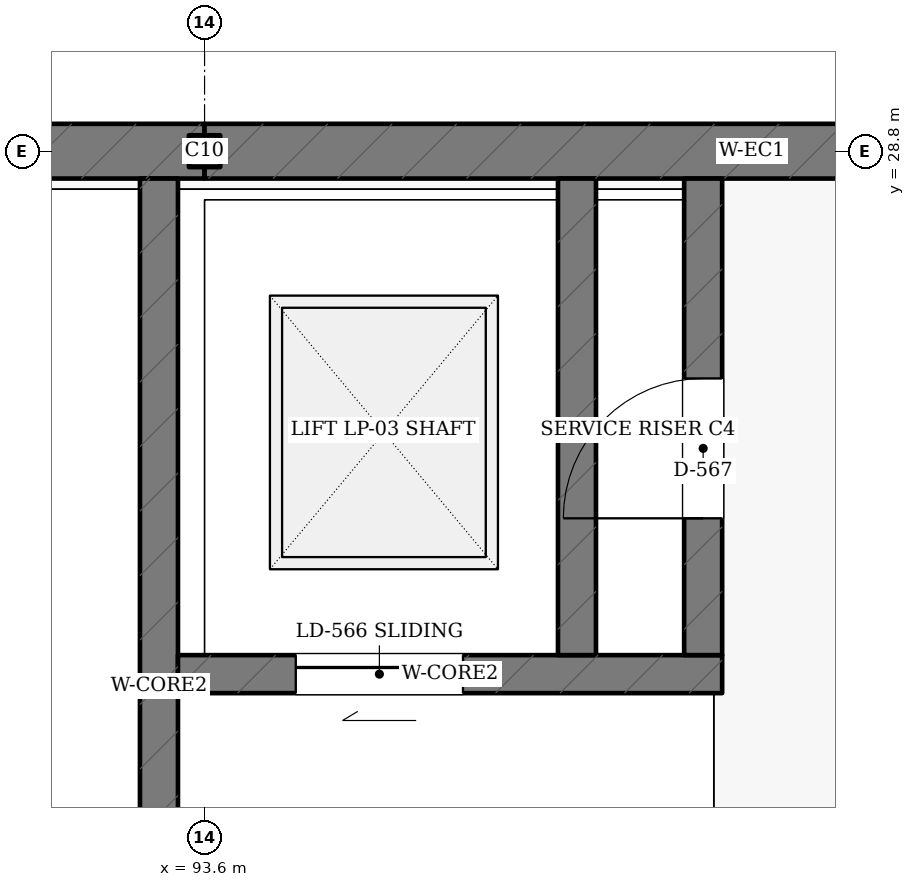
"""IFC4 building model, lengths in metres.
Left out: names, types, materials, properties, quantities, classifications, styles, units other than length and angle.
Written with IfcOpenShell. Run it as: python <this file> out.ifc"""

import sys

from ifc_helpers import new_model, si_unit, direction, frame, frame_2d, origin, origin_2d, place, context, subcontext, project, spatial, rectangle, i_section, extrude, element, fill, save


model = new_model("IFC4")
c1 = context("Model", 3, precision=1e-05, world=origin(), true_north=direction((0.0, 1.0)))
c2 = subcontext(c1, "Body", "Model", "MODEL_VIEW")
j1 = project(units=[si_unit("LENGTHUNIT", "METRE"), si_unit("PLANEANGLEUNIT", "RADIAN")], contexts=[c1])
p1 = place(None, origin())
s1 = spatial("IfcSite", under=j1, at=p1, CompositionType="ELEMENT")
p2 = place(p1, origin())
s2 = spatial("IfcBuilding", under=s1, at=p2, CompositionType="ELEMENT")
p3 = place(p2, frame((0.0, 0.0, 9.9)))
s3 = spatial("IfcBuildingStorey", under=s2, at=p3, CompositionType="ELEMENT", Elevation=9.9)
p4 = place(p3, frame((93.6, 28.8, 0.0), z_axis=(0.0, 0.0, 1.0), x_axis=(1.0, 0.0, 0.0)))
e1 = element("IfcColumn", 1, at=p4, inside=s3, PredefinedType="COLUMN", context=c2, shape_type="SweptSolid", body=[
    extrude(i_section(OverallWidth=0.206, OverallDepth=0.21, WebThickness=0.01, FlangeThickness=0.014, FilletRadius=0.01, at=origin_2d()), origin(), (0.0, 0.0, 1.0), 4.5),
])
p5 = place(p3, frame((86.4, 28.8, 0.0), z_axis=(0.0, 0.0, 1.0), x_axis=(1.0, 0.0, 0.0)))
e2 = element("IfcWall", 2, at=p5, inside=s3, PredefinedType="SHEAR", context=c2, shape_type="SweptSolid", body=[
    extrude(rectangle(XDim=7.2, YDim=0.36, at=frame_2d((3.6, 0.0))), origin(), (0.0, 0.0, 1.0), 3.605),
])
p6 = place(p3, frame((93.6, 28.8, 0.0), z_axis=(0.0, 0.0, 1.0), x_axis=(1.0, 0.0, 0.0)))
e3 = element("IfcWall", 3, at=p6, inside=s3, PredefinedType="SHEAR", context=c2, shape_type="SweptSolid", body=[
    extrude(rectangle(XDim=7.2, YDim=0.36, at=frame_2d((3.6, 0.0))), origin(), (0.0, 0.0, 1.0), 3.455),
])
p7 = place(p3, frame((93.3, 21.95, 0.0), z_axis=(0.0, 0.0, 1.0), x_axis=(0.0, 1.0, 0.0)))
e4 = element("IfcWall", 4, at=p7, inside=s3, PredefinedType="SHEAR", context=c2, shape_type="SweptSolid", body=[
    extrude(rectangle(XDim=6.67, YDim=0.25, at=frame_2d((3.335, 0.0))), origin(), (0.0, 0.0, 1.0), 3.6),
])
p8 = place(p7, frame((0.95, 0.0, 0.0)))
e5 = element("IfcOpeningElement", 5, at=p8, cuts=e4, PredefinedType="OPENING", context=c2, shape_type="SweptSolid", body=[
    extrude(rectangle(XDim=1.35, YDim=2.15, at=frame_2d((0.675, 1.075))), frame((0.0, 0.135, 0.0), z_axis=(0.0, -1.0, 0.0), x_axis=(1.0, 0.0, 0.0)), (0.0, 0.0, 1.0), 0.27),
])
p9 = place(p3, frame((93.425, 25.36, 0.0), z_axis=(0.0, 0.0, 1.0), x_axis=(1.0, 0.0, 0.0)))
e6 = element("IfcWall", 6, at=p9, inside=s3, PredefinedType="SHEAR", context=c2, shape_type="SweptSolid", body=[
    extrude(rectangle(XDim=3.58, YDim=0.25, at=frame_2d((1.79, 0.0))), origin(), (0.0, 0.0, 1.0), 3.6),
])
p10 = place(p9, frame((0.775, 0.0, 0.0)))
e7 = element("IfcOpeningElement", 7, at=p10, cuts=e6, PredefinedType="OPENING", context=c2, shape_type="SweptSolid", body=[
    extrude(rectangle(XDim=1.1, YDim=2.15, at=frame_2d((0.55, 1.075))), frame((0.0, 0.135, 0.0), z_axis=(0.0, -1.0, 0.0), x_axis=(1.0, 0.0, 0.0)), (0.0, 0.0, 1.0), 0.27),
])
p11 = place(p3, frame((96.05, 25.485, 0.0), z_axis=(0.0, 0.0, 1.0), x_axis=(0.0, 1.0, 0.0)))
e8 = element("IfcWall", 8, at=p11, inside=s3, PredefinedType="SHEAR", context=c2, shape_type="SweptSolid", body=[
    extrude(rectangle(XDim=3.135, YDim=0.25, at=frame_2d((1.567, 0.0))), origin(), (0.0, 0.0, 1.0), 3.6),
])
p12 = place(p3, frame((96.88, 25.485, 0.0), z_axis=(0.0, 0.0, 1.0), x_axis=(0.0, 1.0, 0.0)))
e9 = element("IfcWall", 9, at=p12, inside=s3, PredefinedType="SHEAR", context=c2, shape_type="SweptSolid", body=[
    extrude(rectangle(XDim=3.135, YDim=0.25, at=frame_2d((1.567, 0.0))), origin(), (0.0, 0.0, 1.0), 3.6),
])
p13 = place(p12, frame((0.9, 0.0, 0.0)))
e10 = element("IfcOpeningElement", 10, at=p13, cuts=e9, PredefinedType="OPENING", context=c2, shape_type="SweptSolid", body=[
    extrude(rectangle(XDim=0.92, YDim=2.05, at=frame_2d((0.46, 1.025))), frame((0.0, 0.135, 0.0), z_axis=(0.0, -1.0, 0.0), x_axis=(1.0, 0.0, 0.0)), (0.0, 0.0, 1.0), 0.27),
])
p14 = place(p10, origin())
e11 = element("IfcDoor", 11, at=p14, inside=s3, OperationType="SLIDING_TO_LEFT", PredefinedType="DOOR", context=c2, shape_type="SweptSolid", body=[
    extrude(rectangle(XDim=1.1, YDim=2.15, at=frame_2d((0.55, 1.075))), frame((0.0, 0.025, 0.0), z_axis=(0.0, -1.0, 0.0), x_axis=(1.0, 0.0, 0.0)), (0.0, 0.0, 1.0), 0.05),
])
fill(e7, e11)
p15 = place(p13, origin())
e12 = element("IfcDoor", 12, at=p15, inside=s3, OperationType="SINGLE_SWING_LEFT", PredefinedType="DOOR", context=c2, shape_type="SweptSolid", body=[
    extrude(rectangle(XDim=0.92, YDim=2.05, at=frame_2d((0.46, 1.025))), frame((0.0, 0.025, 0.0), z_axis=(0.0, -1.0, 0.0), x_axis=(1.0, 0.0, 0.0)), (0.0, 0.0, 1.0), 0.05),
])
fill(e10, e12)
save(model, sys.argv[1])
